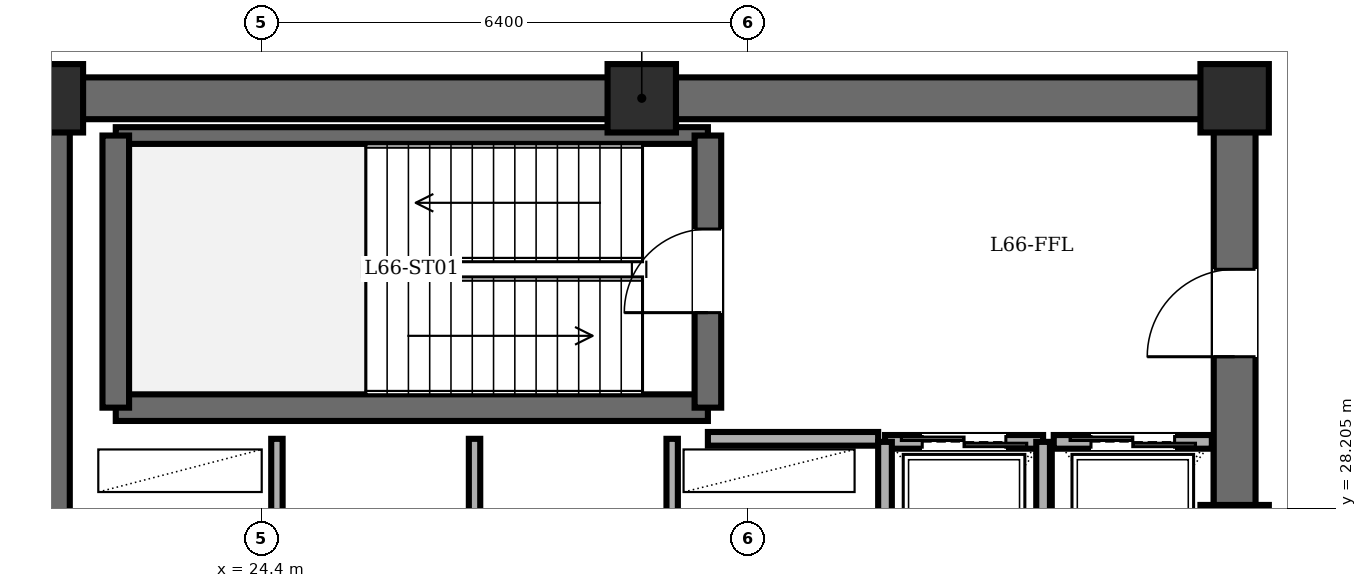
"""IFC4 building model, lengths in metres.
Left out: names, types, materials, properties, quantities, classifications, styles, units other than length and angle.
Written with IfcOpenShell. Run it as: python <this file> out.ifc"""

import sys

from ifc_helpers import new_model, si_unit, direction, frame, frame_2d, origin, origin_2d, place, context, subcontext, project, spatial, rectangle, extrude, element, fill, save


model = new_model("IFC4")
c1 = context("Model", 3, precision=1e-05, world=origin(), true_north=direction((0.0, 1.0)))
c2 = subcontext(c1, "Body", "Model", "MODEL_VIEW")
j1 = project(units=[si_unit("LENGTHUNIT", "METRE"), si_unit("PLANEANGLEUNIT", "RADIAN")], contexts=[c1])
p1 = place(None, origin())
s1 = spatial("IfcSite", under=j1, at=p1, CompositionType="ELEMENT")
p2 = place(p1, origin())
s2 = spatial("IfcBuilding", under=s1, at=p2, CompositionType="ELEMENT")
p3 = place(p2, frame((0.0, 0.0, 253.7)))
s3 = spatial("IfcBuildingStorey", under=s2, at=p3, CompositionType="ELEMENT", Elevation=253.7)
for number, where, z_axis, x_axis in (
    (1, (37.2, 27.8, 0.0), (0.0, 0.0, 1.0), (1.0, 0.0, 0.0)),
    (2, (37.2, 33.6, 0.0), (0.0, 0.0, 1.0), (1.0, 0.0, 0.0)),
    (3, (29.4, 33.6, 0.0), (0.0, 0.0, 1.0), (1.0, 0.0, 0.0)),
    (4, (21.6, 33.6, 0.0), (0.0, 0.0, 1.0), (1.0, 0.0, 0.0)),
):
    element("IfcColumn", number, at=place(p3, frame(where, z_axis=z_axis, x_axis=x_axis)), inside=s3, PredefinedType="COLUMN", context=c2, shape_type="SweptSolid", body=[
        extrude(rectangle(XDim=0.9, YDim=0.9, at=origin_2d()), origin(), (0.0, 0.0, 1.0), 5.1),
    ])
p4 = place(p3, frame((21.6, 14.4, 0.0), z_axis=(0.0, 0.0, 1.0), x_axis=(0.0, 1.0, 0.0)))
e5 = element("IfcWall", 5, at=p4, inside=s3, PredefinedType="SHEAR", context=c2, shape_type="SweptSolid", body=[
    extrude(rectangle(XDim=19.2, YDim=0.55, at=frame_2d((9.6, 0.0))), origin(), (0.0, 0.0, 1.0), 4.9),
])
p5 = place(p3, frame((21.6, 33.6, 0.0), z_axis=(0.0, 0.0, 1.0), x_axis=(1.0, 0.0, 0.0)))
e6 = element("IfcWall", 6, at=p5, inside=s3, PredefinedType="SHEAR", context=c2, shape_type="SweptSolid", body=[
    extrude(rectangle(XDim=15.6, YDim=0.55, at=frame_2d((7.8, 0.0))), origin(), (0.0, 0.0, 1.0), 4.9),
])
p6 = place(p3, frame((37.2, 14.4, 0.0), z_axis=(0.0, 0.0, 1.0), x_axis=(0.0, 1.0, 0.0)))
e7 = element("IfcWall", 7, at=p6, inside=s3, PredefinedType="SHEAR", context=c2, shape_type="SweptSolid", body=[
    extrude(rectangle(XDim=19.2, YDim=0.55, at=frame_2d((9.6, 0.0))), origin(), (0.0, 0.0, 1.0), 4.9),
])
p7 = place(p6, frame((15.8, 0.0, 0.0)))
e8 = element("IfcOpeningElement", 8, at=p7, cuts=e7, PredefinedType="OPENING", context=c2, shape_type="SweptSolid", body=[
    extrude(rectangle(XDim=1.15, YDim=2.15, at=frame_2d((0.575, 1.075))), frame((0.0, 0.285, 0.0), z_axis=(0.0, -1.0, 0.0), x_axis=(1.0, 0.0, 0.0)), (0.0, 0.0, 1.0), 0.57),
])
p8 = place(p6, frame((3.6, 0.0, 0.0)))
e9 = element("IfcOpeningElement", 9, at=p8, cuts=e7, PredefinedType="OPENING", context=c2, shape_type="SweptSolid", body=[
    extrude(rectangle(XDim=1.1, YDim=2.15, at=frame_2d((0.55, 1.075))), frame((0.0, 0.285, 0.0), z_axis=(0.0, -1.0, 0.0), x_axis=(1.0, 0.0, 0.0)), (0.0, 0.0, 1.0), 0.57),
])
p9 = place(p6, frame((8.6, 0.0, 0.0)))
e10 = element("IfcOpeningElement", 10, at=p9, cuts=e7, PredefinedType="OPENING", context=c2, shape_type="SweptSolid", body=[
    extrude(rectangle(XDim=1.3, YDim=2.2, at=frame_2d((0.65, 1.1))), frame((0.0, 0.285, 0.0), z_axis=(0.0, -1.0, 0.0), x_axis=(1.0, 0.0, 0.0)), (0.0, 0.0, 1.0), 0.57),
])
p10 = place(p3, frame((22.48, 29.53, 0.0), z_axis=(0.0, 0.0, 1.0), x_axis=(1.0, 0.0, 0.0)))
e11 = element("IfcWall", 11, at=p10, inside=s3, PredefinedType="SOLIDWALL", context=c2, shape_type="SweptSolid", body=[
    extrude(rectangle(XDim=7.79, YDim=0.35, at=frame_2d((3.895, 0.0))), origin(), (0.0, 0.0, 1.0), 4.9),
])
p11 = place(p3, frame((22.48, 33.11, 0.0), z_axis=(0.0, 0.0, 1.0), x_axis=(1.0, 0.0, 0.0)))
e12 = element("IfcWall", 12, at=p11, inside=s3, PredefinedType="PARTITIONING", context=c2, shape_type="SweptSolid", body=[
    extrude(rectangle(XDim=7.79, YDim=0.22, at=frame_2d((3.895, 0.0))), origin(), (0.0, 0.0, 1.0), 4.9),
])
p12 = place(p3, frame((22.48, 29.53, 0.0), z_axis=(0.0, 0.0, 1.0), x_axis=(0.0, 1.0, 0.0)))
e13 = element("IfcWall", 13, at=p12, inside=s3, PredefinedType="SOLIDWALL", context=c2, shape_type="SweptSolid", body=[
    extrude(rectangle(XDim=3.58, YDim=0.35, at=frame_2d((1.79, 0.0))), origin(), (0.0, 0.0, 1.0), 4.9),
])
p13 = place(p3, frame((30.27, 29.53, 0.0), z_axis=(0.0, 0.0, 1.0), x_axis=(0.0, 1.0, 0.0)))
e14 = element("IfcWall", 14, at=p13, inside=s3, PredefinedType="SOLIDWALL", context=c2, shape_type="SweptSolid", body=[
    extrude(rectangle(XDim=3.58, YDim=0.35, at=frame_2d((1.79, 0.0))), origin(), (0.0, 0.0, 1.0), 4.9),
])
p14 = place(p13, frame((1.25, 0.0, 0.0)))
e15 = element("IfcOpeningElement", 15, at=p14, cuts=e14, PredefinedType="OPENING", context=c2, shape_type="SweptSolid", body=[
    extrude(rectangle(XDim=1.1, YDim=2.15, at=frame_2d((0.55, 1.075))), frame((0.0, 0.185, 0.0), z_axis=(0.0, -1.0, 0.0), x_axis=(1.0, 0.0, 0.0)), (0.0, 0.0, 1.0), 0.37),
])
p15 = place(p3, frame((30.27, 29.12, 0.0), z_axis=(0.0, 0.0, 1.0), x_axis=(1.0, 0.0, 0.0)))
e16 = element("IfcWall", 16, at=p15, inside=s3, PredefinedType="PARTITIONING", context=c2, shape_type="SweptSolid", body=[
    extrude(rectangle(XDim=2.24, YDim=0.18, at=frame_2d((1.12, 0.0))), origin(), (0.0, 0.0, 1.0), 4.9),
])
for number, where, z_axis, x_axis in (
    (17, (24.6, 27.6, 0.0), (0.0, 0.0, 1.0), (0.0, 1.0, 0.0)),
    (18, (27.2, 27.6, 0.0), (0.0, 0.0, 1.0), (0.0, 1.0, 0.0)),
    (19, (29.8, 27.6, 0.0), (0.0, 0.0, 1.0), (0.0, 1.0, 0.0)),
):
    element("IfcWall", number, at=place(p3, frame(where, z_axis=z_axis, x_axis=x_axis)), inside=s3, PredefinedType="PARTITIONING", context=c2, shape_type="SweptSolid", body=[
        extrude(rectangle(XDim=1.52, YDim=0.15, at=frame_2d((0.76, 0.0))), origin(), (0.0, 0.0, 1.0), 4.9),
    ])
p16 = place(p3, frame((32.6, 29.08, 0.0), z_axis=(0.0, 0.0, 1.0), x_axis=(1.0, 0.0, 0.0)))
e20 = element("IfcWall", 20, at=p16, inside=s3, PredefinedType="PARTITIONING", context=c2, shape_type="SweptSolid", body=[
    extrude(rectangle(XDim=2.08, YDim=0.18, at=frame_2d((1.04, 0.0))), origin(), (0.0, 0.0, 1.0), 4.9),
])
p17 = place(p16, frame((0.49, 0.0, 0.0)))
e21 = element("IfcOpeningElement", 21, at=p17, cuts=e20, PredefinedType="OPENING", context=c2, shape_type="SweptSolid", body=[
    extrude(rectangle(XDim=1.1, YDim=2.2, at=frame_2d((0.55, 1.1))), frame((0.0, 0.1, 0.0), z_axis=(0.0, -1.0, 0.0), x_axis=(1.0, 0.0, 0.0)), (0.0, 0.0, 1.0), 0.2),
])
for number, where, z_axis, x_axis in (
    (22, (34.68, 26.35, 0.0), (0.0, 0.0, 1.0), (0.0, 1.0, 0.0)),
    (23, (32.6, 29.08, 0.0), (0.0, 0.0, 1.0), (0.0, -1.0, 0.0)),
):
    element("IfcWall", number, at=place(p3, frame(where, z_axis=z_axis, x_axis=x_axis)), inside=s3, PredefinedType="PARTITIONING", context=c2, shape_type="SweptSolid", body=[
        extrude(rectangle(XDim=2.73, YDim=0.18, at=frame_2d((1.365, 0.0))), origin(), (0.0, 0.0, 1.0), 4.9),
    ])
p18 = place(p3, frame((34.82, 29.08, 0.0), z_axis=(0.0, 0.0, 1.0), x_axis=(1.0, 0.0, 0.0)))
e24 = element("IfcWall", 24, at=p18, inside=s3, PredefinedType="PARTITIONING", context=c2, shape_type="SweptSolid", body=[
    extrude(rectangle(XDim=2.08, YDim=0.18, at=frame_2d((1.04, 0.0))), origin(), (0.0, 0.0, 1.0), 4.9),
])
p19 = place(p18, frame((0.49, 0.0, 0.0)))
e25 = element("IfcOpeningElement", 25, at=p19, cuts=e24, PredefinedType="OPENING", context=c2, shape_type="SweptSolid", body=[
    extrude(rectangle(XDim=1.1, YDim=2.2, at=frame_2d((0.55, 1.1))), frame((0.0, 0.1, 0.0), z_axis=(0.0, -1.0, 0.0), x_axis=(1.0, 0.0, 0.0)), (0.0, 0.0, 1.0), 0.2),
])
p20 = place(p14, origin())
e26 = element("IfcDoor", 26, at=p20, inside=s3, OperationType="SINGLE_SWING_LEFT", PredefinedType="DOOR", context=c2, shape_type="SweptSolid", body=[
    extrude(rectangle(XDim=1.1, YDim=2.15, at=frame_2d((0.55, 1.075))), frame((0.0, 0.025, 0.0), z_axis=(0.0, -1.0, 0.0), x_axis=(1.0, 0.0, 0.0)), (0.0, 0.0, 1.0), 0.05),
])
fill(e15, e26)
p21 = place(p7, origin())
e27 = element("IfcDoor", 27, at=p21, inside=s3, OperationType="SINGLE_SWING_LEFT", PredefinedType="DOOR", context=c2, shape_type="SweptSolid", body=[
    extrude(rectangle(XDim=1.15, YDim=2.15, at=frame_2d((0.575, 1.075))), frame((0.0, 0.025, 0.0), z_axis=(0.0, -1.0, 0.0), x_axis=(1.0, 0.0, 0.0)), (0.0, 0.0, 1.0), 0.05),
])
fill(e8, e27)
p22 = place(p17, origin())
e28 = element("IfcDoor", 28, at=p22, inside=s3, OperationType="DOUBLE_DOOR_SLIDING", PredefinedType="DOOR", context=c2, shape_type="SweptSolid", body=[
    extrude(rectangle(XDim=1.1, YDim=2.2, at=frame_2d((0.55, 1.1))), frame((0.0, 0.025, 0.0), z_axis=(0.0, -1.0, 0.0), x_axis=(1.0, 0.0, 0.0)), (0.0, 0.0, 1.0), 0.05),
])
fill(e21, e28)
p23 = place(p19, origin())
e29 = element("IfcDoor", 29, at=p23, inside=s3, OperationType="DOUBLE_DOOR_SLIDING", PredefinedType="DOOR", context=c2, shape_type="SweptSolid", body=[
    extrude(rectangle(XDim=1.1, YDim=2.2, at=frame_2d((0.55, 1.1))), frame((0.0, 0.025, 0.0), z_axis=(0.0, -1.0, 0.0), x_axis=(1.0, 0.0, 0.0)), (0.0, 0.0, 1.0), 0.05),
])
fill(e25, e29)
save(model, sys.argv[1])
